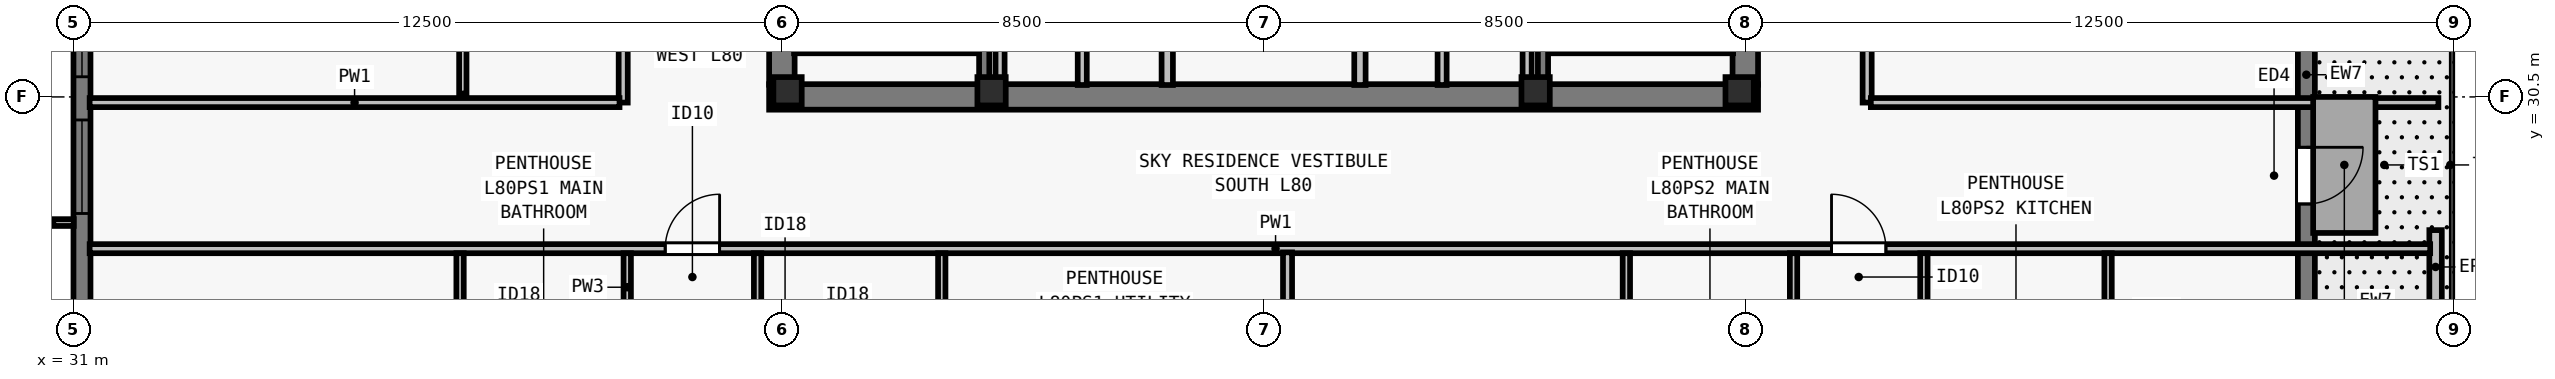
"""IFC4 building model, lengths in metres.
Left out: names, types, materials, properties, quantities, classifications, styles, units other than length and angle.
Written with IfcOpenShell. Run it as: python <this file> out.ifc"""

import sys

from ifc_helpers import new_model, si_unit, direction, frame, frame_2d, origin, origin_2d, place, context, subcontext, project, spatial, rectangle, i_section, extrude, element, fill, save


model = new_model("IFC4")
c1 = context("Model", 3, precision=1e-05, world=origin(), true_north=direction((0.0, 1.0)))
c2 = subcontext(c1, "Body", "Model", "MODEL_VIEW")
j1 = project(units=[si_unit("LENGTHUNIT", "METRE"), si_unit("PLANEANGLEUNIT", "RADIAN")], contexts=[c1])
p1 = place(None, origin())
s1 = spatial("IfcSite", under=j1, at=p1, CompositionType="ELEMENT")
p2 = place(p1, origin())
s2 = spatial("IfcBuilding", under=s1, at=p2, CompositionType="ELEMENT")
p3 = place(p2, frame((0.0, 0.0, 291.0)))
s3 = spatial("IfcBuildingStorey", under=s2, at=p3, CompositionType="ELEMENT", Elevation=291.0)
for number, where, z_axis, x_axis in (
    (1, (43.6, 30.6, 0.0), (0.0, 0.0, 1.0), (1.0, 0.0, 0.0)),
    (2, (47.2, 30.6, 0.0), (0.0, 0.0, 1.0), (1.0, 0.0, 0.0)),
    (3, (56.8, 30.6, 0.0), (0.0, 0.0, 1.0), (1.0, 0.0, 0.0)),
    (4, (60.4, 30.6, 0.0), (0.0, 0.0, 1.0), (1.0, 0.0, 0.0)),
):
    element("IfcColumn", number, at=place(p3, frame(where, z_axis=z_axis, x_axis=x_axis)), inside=s3, PredefinedType="COLUMN", context=c2, shape_type="SweptSolid", body=[
        extrude(i_section(OverallWidth=0.5, OverallDepth=0.5, WebThickness=0.028, FlangeThickness=0.045, at=origin_2d()), origin(), (0.0, 0.0, 1.0), 3.5),
    ])
p4 = place(p3, frame((31.15, 23.5, 0.0), z_axis=(0.0, 0.0, 1.0), x_axis=(0.0, 1.0, 0.0)))
e5 = element("IfcWall", 5, at=p4, inside=s3, PredefinedType="SOLIDWALL", context=c2, shape_type="SweptSolid", body=[
    extrude(rectangle(XDim=30.722, YDim=0.3, at=frame_2d((15.361, 0.0))), origin(), (0.0, 0.0, 1.0), 3.29),
])
p5 = place(p4, frame((4.944, 0.0, 0.8)))
e6 = element("IfcOpeningElement", 6, at=p5, cuts=e5, PredefinedType="OPENING", context=c2, shape_type="SweptSolid", body=[
    extrude(rectangle(XDim=1.65, YDim=1.758, at=frame_2d((0.825, 0.879))), frame((0.0, 0.16, 0.0), z_axis=(0.0, -1.0, 0.0), x_axis=(1.0, 0.0, 0.0)), (0.0, 0.0, 1.0), 0.32),
])
p6 = place(p4, frame((7.355, 0.0, 0.8)))
e7 = element("IfcOpeningElement", 7, at=p6, cuts=e5, PredefinedType="OPENING", context=c2, shape_type="SweptSolid", body=[
    extrude(rectangle(XDim=2.0, YDim=1.758, at=frame_2d((1.0, 0.879))), frame((0.0, 0.16, 0.0), z_axis=(0.0, -1.0, 0.0), x_axis=(1.0, 0.0, 0.0)), (0.0, 0.0, 1.0), 0.32),
])
p7 = place(p4, frame((12.617, 0.0, 0.8)))
e8 = element("IfcOpeningElement", 8, at=p7, cuts=e5, PredefinedType="OPENING", context=c2, shape_type="SweptSolid", body=[
    extrude(rectangle(XDim=1.65, YDim=1.758, at=frame_2d((0.825, 0.879))), frame((0.0, 0.16, 0.0), z_axis=(0.0, -1.0, 0.0), x_axis=(1.0, 0.0, 0.0)), (0.0, 0.0, 1.0), 0.32),
])
p8 = place(p4, frame((16.28, 0.0, 0.8)))
e9 = element("IfcOpeningElement", 9, at=p8, cuts=e5, PredefinedType="OPENING", context=c2, shape_type="SweptSolid", body=[
    extrude(rectangle(XDim=2.0, YDim=1.758, at=frame_2d((1.0, 0.879))), frame((0.0, 0.16, 0.0), z_axis=(0.0, -1.0, 0.0), x_axis=(1.0, 0.0, 0.0)), (0.0, 0.0, 1.0), 0.32),
])
p9 = place(p4, frame((21.142, 0.0, 0.8)))
e10 = element("IfcOpeningElement", 10, at=p9, cuts=e5, PredefinedType="OPENING", context=c2, shape_type="SweptSolid", body=[
    extrude(rectangle(XDim=1.65, YDim=1.758, at=frame_2d((0.825, 0.879))), frame((0.0, 0.16, 0.0), z_axis=(0.0, -1.0, 0.0), x_axis=(1.0, 0.0, 0.0)), (0.0, 0.0, 1.0), 0.32),
])
p10 = place(p4, frame((27.11, 0.0, 0.8)))
e11 = element("IfcOpeningElement", 11, at=p10, cuts=e5, PredefinedType="OPENING", context=c2, shape_type="SweptSolid", body=[
    extrude(rectangle(XDim=0.9, YDim=1.75, at=frame_2d((0.45, 0.875))), frame((0.0, 0.16, 0.0), z_axis=(0.0, -1.0, 0.0), x_axis=(1.0, 0.0, 0.0)), (0.0, 0.0, 1.0), 0.32),
])
p11 = place(p3, frame((70.4, 32.022, 0.0), z_axis=(0.0, 0.0, 1.0), x_axis=(0.0, -1.0, 0.0)))
e12 = element("IfcWall", 12, at=p11, inside=s3, PredefinedType="SOLIDWALL", context=c2, shape_type="SweptSolid", body=[
    extrude(rectangle(XDim=5.722, YDim=0.3, at=frame_2d((2.861, 0.0))), origin(), (0.0, 0.0, 1.0), 3.29),
])
p12 = place(p11, frame((2.411, 0.0, 0.0)))
e13 = element("IfcOpeningElement", 13, at=p12, cuts=e12, PredefinedType="OPENING", context=c2, shape_type="SweptSolid", body=[
    extrude(rectangle(XDim=1.0, YDim=2.15, at=frame_2d((0.5, 1.075))), frame((0.0, 0.16, 0.0), z_axis=(0.0, -1.0, 0.0), x_axis=(1.0, 0.0, 0.0)), (0.0, 0.0, 1.0), 0.32),
])
p13 = place(p3, frame((72.68, 26.85, 0.0), z_axis=(0.0, 0.0, 1.0), x_axis=(0.0, 1.0, 0.0)))
e14 = element("IfcWall", 14, at=p13, inside=s3, PredefinedType="PARAPET", context=c2, shape_type="SweptSolid", body=[
    extrude(rectangle(XDim=1.3, YDim=0.22, at=frame_2d((0.65, 0.0))), origin(), (0.0, 0.0, 1.0), 0.55),
])
p14 = place(p3, frame((43.275, 30.5, 0.0), z_axis=(0.0, 0.0, 1.0), x_axis=(1.0, 0.0, 0.0)))
e15 = element("IfcWall", 15, at=p14, inside=s3, PredefinedType="SHEAR", context=c2, shape_type="SweptSolid", body=[
    extrude(rectangle(XDim=17.45, YDim=0.45, at=frame_2d((8.725, 0.0))), origin(), (0.0, 0.0, 1.0), 3.29),
])
for number, where, z_axis, x_axis in (
    (16, (43.5, 30.715, 0.0), (0.0, 0.0, 1.0), (0.0, 1.0, 0.0)),
    (17, (60.5, 30.715, 0.0), (0.0, 0.0, 1.0), (0.0, 1.0, 0.0)),
):
    element("IfcWall", number, at=place(p3, frame(where, z_axis=z_axis, x_axis=x_axis)), inside=s3, PredefinedType="SHEAR", context=c2, shape_type="SweptSolid", body=[
        extrude(rectangle(XDim=8.035, YDim=0.45, at=frame_2d((4.018, 0.0))), origin(), (0.0, 0.0, 1.0), 3.29),
    ])
p15 = place(p3, frame((50.3, 30.71, 0.0), z_axis=(0.0, 0.0, 1.0), x_axis=(0.0, 1.0, 0.0)))
e18 = element("IfcWall", 18, at=p15, inside=s3, PredefinedType="SOLIDWALL", context=c2, shape_type="SweptSolid", body=[
    extrude(rectangle(XDim=7.905, YDim=0.2, at=frame_2d((3.953, 0.0))), origin(), (0.0, 0.0, 1.0), 3.29),
])
p16 = place(p15, frame((2.14, 0.0, 0.0)))
e19 = element("IfcOpeningElement", 19, at=p16, cuts=e18, PredefinedType="OPENING", context=c2, shape_type="SweptSolid", body=[
    extrude(rectangle(XDim=0.95, YDim=2.12, at=frame_2d((0.475, 1.06))), frame((0.0, 0.11, 0.0), z_axis=(0.0, -1.0, 0.0), x_axis=(1.0, 0.0, 0.0)), (0.0, 0.0, 1.0), 0.22),
])
p17 = place(p3, frame((53.7, 30.71, 0.0), z_axis=(0.0, 0.0, 1.0), x_axis=(0.0, 1.0, 0.0)))
e20 = element("IfcWall", 20, at=p17, inside=s3, PredefinedType="SOLIDWALL", context=c2, shape_type="SweptSolid", body=[
    extrude(rectangle(XDim=7.905, YDim=0.2, at=frame_2d((3.953, 0.0))), origin(), (0.0, 0.0, 1.0), 3.29),
])
p18 = place(p17, frame((2.14, 0.0, 0.0)))
e21 = element("IfcOpeningElement", 21, at=p18, cuts=e20, PredefinedType="OPENING", context=c2, shape_type="SweptSolid", body=[
    extrude(rectangle(XDim=0.95, YDim=2.12, at=frame_2d((0.475, 1.06))), frame((0.0, 0.11, 0.0), z_axis=(0.0, -1.0, 0.0), x_axis=(1.0, 0.0, 0.0)), (0.0, 0.0, 1.0), 0.22),
])
p19 = place(p3, frame((47.35, 30.71, 0.0), z_axis=(0.0, 0.0, 1.0), x_axis=(0.0, 1.0, 0.0)))
e22 = element("IfcWall", 22, at=p19, inside=s3, PredefinedType="PARTITIONING", context=c2, shape_type="SweptSolid", body=[
    extrude(rectangle(XDim=7.905, YDim=0.16, at=frame_2d((3.953, 0.0))), origin(), (0.0, 0.0, 1.0), 3.29),
])
p20 = place(p3, frame((48.8, 30.71, 0.0), z_axis=(0.0, 0.0, 1.0), x_axis=(0.0, 1.0, 0.0)))
e23 = element("IfcWall", 23, at=p20, inside=s3, PredefinedType="PARTITIONING", context=c2, shape_type="SweptSolid", body=[
    extrude(rectangle(XDim=7.905, YDim=0.16, at=frame_2d((3.953, 0.0))), origin(), (0.0, 0.0, 1.0), 3.29),
])
p21 = place(p20, frame((3.54, 0.0, 0.0)))
e24 = element("IfcOpeningElement", 24, at=p21, cuts=e23, PredefinedType="OPENING", context=c2, shape_type="SweptSolid", body=[
    extrude(rectangle(XDim=0.85, YDim=2.12, at=frame_2d((0.425, 1.06))), frame((0.0, 0.09, 0.0), z_axis=(0.0, -1.0, 0.0), x_axis=(1.0, 0.0, 0.0)), (0.0, 0.0, 1.0), 0.18),
])
p22 = place(p3, frame((56.65, 30.71, 0.0), z_axis=(0.0, 0.0, 1.0), x_axis=(0.0, 1.0, 0.0)))
e25 = element("IfcWall", 25, at=p22, inside=s3, PredefinedType="PARTITIONING", context=c2, shape_type="SweptSolid", body=[
    extrude(rectangle(XDim=7.905, YDim=0.16, at=frame_2d((3.953, 0.0))), origin(), (0.0, 0.0, 1.0), 3.29),
])
p23 = place(p3, frame((55.15, 30.71, 0.0), z_axis=(0.0, 0.0, 1.0), x_axis=(0.0, 1.0, 0.0)))
e26 = element("IfcWall", 26, at=p23, inside=s3, PredefinedType="PARTITIONING", context=c2, shape_type="SweptSolid", body=[
    extrude(rectangle(XDim=7.905, YDim=0.16, at=frame_2d((3.953, 0.0))), origin(), (0.0, 0.0, 1.0), 3.29),
])
p24 = place(p23, frame((3.54, 0.0, 0.0)))
e27 = element("IfcOpeningElement", 27, at=p24, cuts=e26, PredefinedType="OPENING", context=c2, shape_type="SweptSolid", body=[
    extrude(rectangle(XDim=0.85, YDim=2.12, at=frame_2d((0.425, 1.06))), frame((0.0, 0.09, 0.0), z_axis=(0.0, -1.0, 0.0), x_axis=(1.0, 0.0, 0.0)), (0.0, 0.0, 1.0), 0.18),
])
p25 = place(p3, frame((31.285, 27.823, 0.0), z_axis=(0.0, 0.0, 1.0), x_axis=(1.0, 0.0, 0.0)))
e28 = element("IfcWall", 28, at=p25, inside=s3, PredefinedType="PARTITIONING", context=c2, shape_type="SweptSolid", body=[
    extrude(rectangle(XDim=41.3, YDim=0.16, at=frame_2d((20.65, 0.0))), origin(), (0.0, 0.0, 1.0), 3.009),
])
p26 = place(p25, frame((10.156, 0.0, 0.0)))
e29 = element("IfcOpeningElement", 29, at=p26, cuts=e28, PredefinedType="OPENING", context=c2, shape_type="SweptSolid", body=[
    extrude(rectangle(XDim=0.96, YDim=2.18, at=frame_2d((0.48, 1.09))), frame((0.0, 0.09, 0.0), z_axis=(0.0, -1.0, 0.0), x_axis=(1.0, 0.0, 0.0)), (0.0, 0.0, 1.0), 0.18),
])
p27 = place(p25, frame((30.736, 0.0, 0.0)))
e30 = element("IfcOpeningElement", 30, at=p27, cuts=e28, PredefinedType="OPENING", context=c2, shape_type="SweptSolid", body=[
    extrude(rectangle(XDim=0.96, YDim=2.18, at=frame_2d((0.48, 1.09))), frame((0.0, 0.09, 0.0), z_axis=(0.0, -1.0, 0.0), x_axis=(1.0, 0.0, 0.0)), (0.0, 0.0, 1.0), 0.18),
])
p28 = place(p3, frame((40.7, 30.4, 0.0), z_axis=(0.0, 0.0, 1.0), x_axis=(0.0, 1.0, 0.0)))
e31 = element("IfcWall", 31, at=p28, inside=s3, PredefinedType="PARTITIONING", context=c2, shape_type="SweptSolid", body=[
    extrude(rectangle(XDim=17.2, YDim=0.16, at=frame_2d((8.6, 0.0))), origin(), (0.0, 0.0, 1.0), 3.009),
])
p29 = place(p28, frame((3.82, 0.0, 0.0)))
e32 = element("IfcOpeningElement", 32, at=p29, cuts=e31, PredefinedType="OPENING", context=c2, shape_type="SweptSolid", body=[
    extrude(rectangle(XDim=0.96, YDim=2.18, at=frame_2d((0.48, 1.09))), frame((0.0, 0.09, 0.0), z_axis=(0.0, -1.0, 0.0), x_axis=(1.0, 0.0, 0.0)), (0.0, 0.0, 1.0), 0.18),
])
p30 = place(p28, frame((12.42, 0.0, 0.0)))
e33 = element("IfcOpeningElement", 33, at=p30, cuts=e31, PredefinedType="OPENING", context=c2, shape_type="SweptSolid", body=[
    extrude(rectangle(XDim=0.96, YDim=2.18, at=frame_2d((0.48, 1.09))), frame((0.0, 0.09, 0.0), z_axis=(0.0, -1.0, 0.0), x_axis=(1.0, 0.0, 0.0)), (0.0, 0.0, 1.0), 0.18),
])
p31 = place(p3, frame((62.65, 30.4, 0.0), z_axis=(0.0, 0.0, 1.0), x_axis=(0.0, 1.0, 0.0)))
e34 = element("IfcWall", 34, at=p31, inside=s3, PredefinedType="PARTITIONING", context=c2, shape_type="SweptSolid", body=[
    extrude(rectangle(XDim=17.2, YDim=0.16, at=frame_2d((8.6, 0.0))), origin(), (0.0, 0.0, 1.0), 3.29),
])
p32 = place(p31, frame((8.0, 0.0, 0.0)))
e35 = element("IfcOpeningElement", 35, at=p32, cuts=e34, PredefinedType="OPENING", context=c2, shape_type="SweptSolid", body=[
    extrude(rectangle(XDim=0.96, YDim=2.12, at=frame_2d((0.48, 1.06))), frame((0.0, 0.09, 0.0), z_axis=(0.0, -1.0, 0.0), x_axis=(1.0, 0.0, 0.0)), (0.0, 0.0, 1.0), 0.18),
])
p33 = place(p3, frame((31.285, 30.4, 0.0), z_axis=(0.0, 0.0, 1.0), x_axis=(1.0, 0.0, 0.0)))
e36 = element("IfcWall", 36, at=p33, inside=s3, PredefinedType="PARTITIONING", context=c2, shape_type="SweptSolid", body=[
    extrude(rectangle(XDim=9.35, YDim=0.16, at=frame_2d((4.675, 0.0))), origin(), (0.0, 0.0, 1.0), 3.29),
])
p34 = place(p3, frame((62.715, 30.4, 0.0), z_axis=(0.0, 0.0, 1.0), x_axis=(1.0, 0.0, 0.0)))
e37 = element("IfcWall", 37, at=p34, inside=s3, PredefinedType="PARTITIONING", context=c2, shape_type="SweptSolid", body=[
    extrude(rectangle(XDim=10.015, YDim=0.16, at=frame_2d((5.007, 0.0))), origin(), (0.0, 0.0, 1.0), 3.29),
])
p35 = place(p3, frame((37.821, 24.992, 0.0), z_axis=(0.0, 0.0, 1.0), x_axis=(0.0, 1.0, 0.0)))
e38 = element("IfcWall", 38, at=p35, inside=s3, PredefinedType="PLUMBINGWALL", context=c2, shape_type="SweptSolid", body=[
    extrude(rectangle(XDim=2.75, YDim=0.13, at=frame_2d((1.375, 0.0))), origin(), (0.0, 0.0, 1.0), 3.29),
])
p36 = place(p3, frame((40.771, 24.992, 0.0), z_axis=(0.0, 0.0, 1.0), x_axis=(0.0, 1.0, 0.0)))
e39 = element("IfcWall", 39, at=p36, inside=s3, PredefinedType="PLUMBINGWALL", context=c2, shape_type="SweptSolid", body=[
    extrude(rectangle(XDim=2.75, YDim=0.13, at=frame_2d((1.375, 0.0))), origin(), (0.0, 0.0, 1.0), 2.653),
])
p37 = place(p36, frame((0.55, 0.0, 0.0)))
e40 = element("IfcOpeningElement", 40, at=p37, cuts=e39, PredefinedType="OPENING", context=c2, shape_type="SweptSolid", body=[
    extrude(rectangle(XDim=0.85, YDim=2.08, at=frame_2d((0.425, 1.04))), frame((0.0, 0.075, 0.0), z_axis=(0.0, -1.0, 0.0), x_axis=(1.0, 0.0, 0.0)), (0.0, 0.0, 1.0), 0.15),
])
p38 = place(p3, frame((46.321, 24.992, 0.0), z_axis=(0.0, 0.0, 1.0), x_axis=(0.0, 1.0, 0.0)))
e41 = element("IfcWall", 41, at=p38, inside=s3, PredefinedType="PLUMBINGWALL", context=c2, shape_type="SweptSolid", body=[
    extrude(rectangle(XDim=2.75, YDim=0.13, at=frame_2d((1.375, 0.0))), origin(), (0.0, 0.0, 1.0), 3.29),
])
p39 = place(p3, frame((43.071, 24.992, 0.0), z_axis=(0.0, 0.0, 1.0), x_axis=(0.0, 1.0, 0.0)))
e42 = element("IfcWall", 42, at=p39, inside=s3, PredefinedType="PLUMBINGWALL", context=c2, shape_type="SweptSolid", body=[
    extrude(rectangle(XDim=2.75, YDim=0.13, at=frame_2d((1.375, 0.0))), origin(), (0.0, 0.0, 1.0), 3.29),
])
p40 = place(p39, frame((0.55, 0.0, 0.0)))
e43 = element("IfcOpeningElement", 43, at=p40, cuts=e42, PredefinedType="OPENING", context=c2, shape_type="SweptSolid", body=[
    extrude(rectangle(XDim=0.88, YDim=2.1, at=frame_2d((0.44, 1.05))), frame((0.0, 0.075, 0.0), z_axis=(0.0, -1.0, 0.0), x_axis=(1.0, 0.0, 0.0)), (0.0, 0.0, 1.0), 0.15),
])
p41 = place(p3, frame((52.423, 18.285, 0.0), z_axis=(0.0, 0.0, 1.0), x_axis=(0.0, 1.0, 0.0)))
e44 = element("IfcWall", 44, at=p41, inside=s3, PredefinedType="PARTITIONING", context=c2, shape_type="SweptSolid", body=[
    extrude(rectangle(XDim=9.473, YDim=0.16, at=frame_2d((4.736, 0.0))), origin(), (0.0, 0.0, 1.0), 3.009),
])
p42 = place(p3, frame((58.401, 24.992, 0.0), z_axis=(0.0, 0.0, 1.0), x_axis=(0.0, 1.0, 0.0)))
e45 = element("IfcWall", 45, at=p42, inside=s3, PredefinedType="PLUMBINGWALL", context=c2, shape_type="SweptSolid", body=[
    extrude(rectangle(XDim=2.75, YDim=0.13, at=frame_2d((1.375, 0.0))), origin(), (0.0, 0.0, 1.0), 3.29),
])
p43 = place(p3, frame((61.351, 24.992, 0.0), z_axis=(0.0, 0.0, 1.0), x_axis=(0.0, 1.0, 0.0)))
e46 = element("IfcWall", 46, at=p43, inside=s3, PredefinedType="PLUMBINGWALL", context=c2, shape_type="SweptSolid", body=[
    extrude(rectangle(XDim=2.75, YDim=0.13, at=frame_2d((1.375, 0.0))), origin(), (0.0, 0.0, 1.0), 3.29),
])
p44 = place(p43, frame((0.55, 0.0, 0.0)))
e47 = element("IfcOpeningElement", 47, at=p44, cuts=e46, PredefinedType="OPENING", context=c2, shape_type="SweptSolid", body=[
    extrude(rectangle(XDim=0.85, YDim=2.08, at=frame_2d((0.425, 1.04))), frame((0.0, 0.075, 0.0), z_axis=(0.0, -1.0, 0.0), x_axis=(1.0, 0.0, 0.0)), (0.0, 0.0, 1.0), 0.15),
])
p45 = place(p3, frame((66.901, 24.992, 0.0), z_axis=(0.0, 0.0, 1.0), x_axis=(0.0, 1.0, 0.0)))
e48 = element("IfcWall", 48, at=p45, inside=s3, PredefinedType="PLUMBINGWALL", context=c2, shape_type="SweptSolid", body=[
    extrude(rectangle(XDim=2.75, YDim=0.13, at=frame_2d((1.375, 0.0))), origin(), (0.0, 0.0, 1.0), 3.29),
])
p46 = place(p3, frame((63.651, 24.992, 0.0), z_axis=(0.0, 0.0, 1.0), x_axis=(0.0, 1.0, 0.0)))
e49 = element("IfcWall", 49, at=p46, inside=s3, PredefinedType="PLUMBINGWALL", context=c2, shape_type="SweptSolid", body=[
    extrude(rectangle(XDim=2.75, YDim=0.13, at=frame_2d((1.375, 0.0))), origin(), (0.0, 0.0, 1.0), 2.653),
])
p47 = place(p46, frame((0.55, 0.0, 0.0)))
e50 = element("IfcOpeningElement", 50, at=p47, cuts=e49, PredefinedType="OPENING", context=c2, shape_type="SweptSolid", body=[
    extrude(rectangle(XDim=0.88, YDim=2.1, at=frame_2d((0.44, 1.05))), frame((0.0, 0.075, 0.0), z_axis=(0.0, -1.0, 0.0), x_axis=(1.0, 0.0, 0.0)), (0.0, 0.0, 1.0), 0.15),
])
p48 = place(p3, frame((37.87, 30.56, 0.0), z_axis=(0.0, 0.0, 1.0), x_axis=(0.0, 1.0, 0.0)))
e51 = element("IfcWall", 51, at=p48, inside=s3, PredefinedType="PLUMBINGWALL", context=c2, shape_type="SweptSolid", body=[
    extrude(rectangle(XDim=2.94, YDim=0.13, at=frame_2d((1.47, 0.0))), origin(), (0.0, 0.0, 1.0), 3.29),
])
p49 = place(p3, frame((43.715, 31.36, 0.0), z_axis=(0.0, 0.0, 1.0), x_axis=(1.0, 0.0, 0.0)))
e52 = element("IfcWall", 52, at=p49, inside=s3, PredefinedType="SOLIDWALL", context=c2, shape_type="SweptSolid", body=[
    extrude(rectangle(XDim=3.28, YDim=0.18, at=frame_2d((1.64, 0.0))), origin(), (0.0, 0.0, 1.0), 3.29),
])
p50 = place(p3, frame((47.07, 38.78, 0.0), z_axis=(0.0, 0.0, 1.0), x_axis=(0.0, -1.0, 0.0)))
e53 = element("IfcWall", 53, at=p50, inside=s3, PredefinedType="SOLIDWALL", context=c2, shape_type="SweptSolid", body=[
    extrude(rectangle(XDim=8.067, YDim=0.18, at=frame_2d((4.034, 0.0))), origin(), (0.0, 0.0, 1.0), 3.29),
])
p51 = place(p3, frame((57.005, 31.36, 0.0), z_axis=(0.0, 0.0, 1.0), x_axis=(1.0, 0.0, 0.0)))
e54 = element("IfcWall", 54, at=p51, inside=s3, PredefinedType="SOLIDWALL", context=c2, shape_type="SweptSolid", body=[
    extrude(rectangle(XDim=3.28, YDim=0.18, at=frame_2d((1.64, 0.0))), origin(), (0.0, 0.0, 1.0), 3.29),
])
p52 = place(p3, frame((56.93, 38.78, 0.0), z_axis=(0.0, 0.0, 1.0), x_axis=(0.0, -1.0, 0.0)))
e55 = element("IfcWall", 55, at=p52, inside=s3, PredefinedType="SOLIDWALL", context=c2, shape_type="SweptSolid", body=[
    extrude(rectangle(XDim=8.067, YDim=0.18, at=frame_2d((4.034, 0.0))), origin(), (0.0, 0.0, 1.0), 3.29),
])
p53 = place(p5, origin())
e56 = element("IfcWindow", 56, at=p53, inside=s3, PartitioningType="SINGLE_PANEL", PredefinedType="WINDOW", context=c2, shape_type="SweptSolid", body=[
    extrude(rectangle(XDim=1.65, YDim=1.758, at=frame_2d((0.825, 0.879))), frame((0.0, -0.05, 0.0), z_axis=(0.0, -1.0, 0.0), x_axis=(1.0, 0.0, 0.0)), (0.0, 0.0, 1.0), 0.06),
])
fill(e6, e56)
p54 = place(p6, origin())
e57 = element("IfcWindow", 57, at=p54, inside=s3, PartitioningType="SINGLE_PANEL", PredefinedType="WINDOW", context=c2, shape_type="SweptSolid", body=[
    extrude(rectangle(XDim=2.0, YDim=1.758, at=frame_2d((1.0, 0.879))), frame((0.0, -0.05, 0.0), z_axis=(0.0, -1.0, 0.0), x_axis=(1.0, 0.0, 0.0)), (0.0, 0.0, 1.0), 0.06),
])
fill(e7, e57)
p55 = place(p12, origin())
e58 = element("IfcDoor", 58, at=p55, inside=s3, OperationType="SINGLE_SWING_LEFT", PredefinedType="DOOR", context=c2, shape_type="SweptSolid", body=[
    extrude(rectangle(XDim=1.0, YDim=2.15, at=frame_2d((0.5, 1.075))), frame((0.0, 0.025, 0.0), z_axis=(0.0, -1.0, 0.0), x_axis=(1.0, 0.0, 0.0)), (0.0, 0.0, 1.0), 0.05),
])
fill(e13, e58)
p56 = place(p26, origin())
e59 = element("IfcDoor", 59, at=p56, inside=s3, OperationType="SINGLE_SWING_RIGHT", PredefinedType="DOOR", context=c2, shape_type="SweptSolid", body=[
    extrude(rectangle(XDim=0.96, YDim=2.18, at=frame_2d((0.48, 1.09))), frame((0.0, 0.025, 0.0), z_axis=(0.0, -1.0, 0.0), x_axis=(1.0, 0.0, 0.0)), (0.0, 0.0, 1.0), 0.05),
])
fill(e29, e59)
p57 = place(p27, origin())
e60 = element("IfcDoor", 60, at=p57, inside=s3, OperationType="SINGLE_SWING_LEFT", PredefinedType="DOOR", context=c2, shape_type="SweptSolid", body=[
    extrude(rectangle(XDim=0.96, YDim=2.18, at=frame_2d((0.48, 1.09))), frame((0.0, 0.025, 0.0), z_axis=(0.0, -1.0, 0.0), x_axis=(1.0, 0.0, 0.0)), (0.0, 0.0, 1.0), 0.05),
])
fill(e30, e60)
save(model, sys.argv[1])
